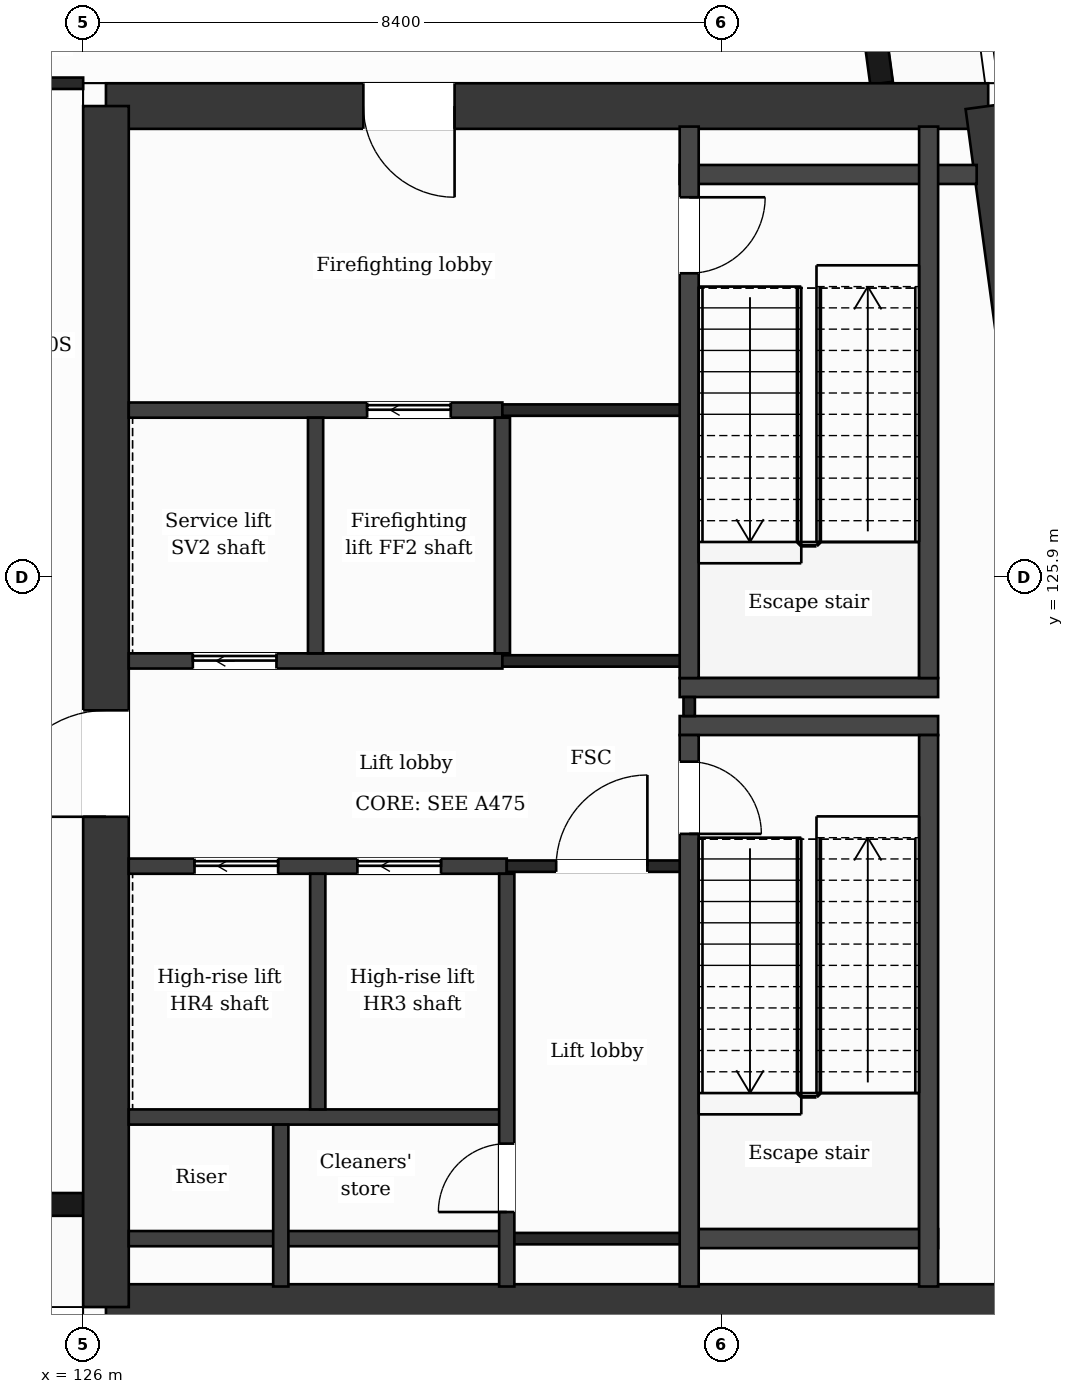
"""IFC4 building model, lengths in metres.
Left out: names, types, materials, properties, quantities, classifications, styles, units other than length and angle.
Written with IfcOpenShell. Run it as: python <this file> out.ifc"""

import sys

from ifc_helpers import new_model, si_unit, direction, frame, frame_2d, origin, place, context, subcontext, project, spatial, rectangle, extrude, element, fill, save


model = new_model("IFC4")
c1 = context("Model", 3, precision=1e-05, world=origin(), true_north=direction((0.0, 1.0)))
c2 = subcontext(c1, "Body", "Model", "MODEL_VIEW")
j1 = project(units=[si_unit("LENGTHUNIT", "METRE"), si_unit("PLANEANGLEUNIT", "RADIAN")], contexts=[c1])
p1 = place(None, origin())
s1 = spatial("IfcSite", under=j1, at=p1, CompositionType="ELEMENT")
p2 = place(p1, origin())
s2 = spatial("IfcBuilding", under=s1, at=p2, CompositionType="ELEMENT")
p3 = place(p2, frame((0.0, 0.0, 303.4)))
s3 = spatial("IfcBuildingStorey", under=s2, at=p3, CompositionType="ELEMENT", Elevation=303.4)
p4 = place(p3, frame((126.3, 132.1, 0.0), z_axis=(0.0, 0.0, 1.0), x_axis=(1.0, 0.0, 0.0)))
e1 = element("IfcWall", 1, at=p4, inside=s3, PredefinedType="SHEAR", context=c2, shape_type="SweptSolid", body=[
    extrude(rectangle(XDim=11.607, YDim=0.6, at=frame_2d((5.803, 0.0))), origin(), (0.0, 0.0, 1.0), 4.5),
])
p5 = place(p4, frame((3.386, 0.0, 0.0)))
e2 = element("IfcOpeningElement", 2, at=p5, cuts=e1, PredefinedType="OPENING", context=c2, shape_type="SweptSolid", body=[
    extrude(rectangle(XDim=1.2, YDim=2.1, at=frame_2d((0.6, 1.05))), frame((0.0, 0.31, 0.0), z_axis=(0.0, -1.0, 0.0), x_axis=(1.0, 0.0, 0.0)), (0.0, 0.0, 1.0), 0.62),
])
p6 = place(p3, frame((137.907, 132.1, 0.0), z_axis=(0.0, 0.0, 1.0), x_axis=(0.13341345841, -0.991060466932, 0.0)))
e3 = element("IfcWall", 3, at=p6, inside=s3, PredefinedType="SHEAR", context=c2, shape_type="SweptSolid", body=[
    extrude(rectangle(XDim=15.943, YDim=0.6, at=frame_2d((7.971, 0.0))), origin(), (0.0, 0.0, 1.0), 4.5),
])
p7 = place(p3, frame((140.034, 116.3, 0.0), z_axis=(0.0, 0.0, 1.0), x_axis=(-1.0, 0.0, 0.0)))
e4 = element("IfcWall", 4, at=p7, inside=s3, PredefinedType="SHEAR", context=c2, shape_type="SweptSolid", body=[
    extrude(rectangle(XDim=13.734, YDim=0.6, at=frame_2d((6.867, 0.0))), origin(), (0.0, 0.0, 1.0), 4.5),
])
p8 = place(p3, frame((126.3, 116.3, 0.0), z_axis=(0.0, 0.0, 1.0), x_axis=(0.0, 1.0, 0.0)))
e5 = element("IfcWall", 5, at=p8, inside=s3, PredefinedType="SHEAR", context=c2, shape_type="SweptSolid", body=[
    extrude(rectangle(XDim=15.8, YDim=0.6, at=frame_2d((7.9, 0.0))), origin(), (0.0, 0.0, 1.0), 4.5),
])
p9 = place(p8, frame((6.45, 0.0, 0.0)))
e6 = element("IfcOpeningElement", 6, at=p9, cuts=e5, PredefinedType="OPENING", context=c2, shape_type="SweptSolid", body=[
    extrude(rectangle(XDim=1.4, YDim=2.1, at=frame_2d((0.7, 1.05))), frame((0.0, 0.31, 0.0), z_axis=(0.0, -1.0, 0.0), x_axis=(1.0, 0.0, 0.0)), (0.0, 0.0, 1.0), 0.62),
])
p10 = place(p3, frame((100.8, 117.65, 0.0), z_axis=(0.0, 0.0, 1.0), x_axis=(1.0, 0.0, 0.0)))
e7 = element("IfcWall", 7, at=p10, inside=s3, PredefinedType="SOLIDWALL", context=c2, shape_type="SweptSolid", body=[
    extrude(rectangle(XDim=25.2, YDim=0.3, at=frame_2d((12.6, 0.0))), origin(), (0.0, 0.0, 1.0), 4.05),
])
p11 = place(p10, frame((1.55, 0.0, 0.9)))
e8 = element("IfcOpeningElement", 8, at=p11, cuts=e7, PredefinedType="OPENING", context=c2, shape_type="SweptSolid", body=[
    extrude(rectangle(XDim=1.2, YDim=2.1, at=frame_2d((0.6, 1.05))), frame((0.0, 0.16, 0.0), z_axis=(0.0, -1.0, 0.0), x_axis=(1.0, 0.0, 0.0)), (0.0, 0.0, 1.0), 0.32),
])
p12 = place(p10, frame((5.1, 0.0, 0.9)))
e9 = element("IfcOpeningElement", 9, at=p12, cuts=e7, PredefinedType="OPENING", context=c2, shape_type="SweptSolid", body=[
    extrude(rectangle(XDim=2.4, YDim=2.1, at=frame_2d((1.2, 1.05))), frame((0.0, 0.16, 0.0), z_axis=(0.0, -1.0, 0.0), x_axis=(1.0, 0.0, 0.0)), (0.0, 0.0, 1.0), 0.32),
])
p13 = place(p10, frame((9.9, 0.0, 0.0)))
e10 = element("IfcOpeningElement", 10, at=p13, cuts=e7, PredefinedType="OPENING", context=c2, shape_type="SweptSolid", body=[
    extrude(rectangle(XDim=1.2, YDim=2.4, at=frame_2d((0.6, 1.2))), frame((0.0, 0.16, 0.0), z_axis=(0.0, -1.0, 0.0), x_axis=(1.0, 0.0, 0.0)), (0.0, 0.0, 1.0), 0.32),
])
p14 = place(p10, frame((13.5, 0.0, 0.9)))
e11 = element("IfcOpeningElement", 11, at=p14, cuts=e7, PredefinedType="OPENING", context=c2, shape_type="SweptSolid", body=[
    extrude(rectangle(XDim=2.4, YDim=2.1, at=frame_2d((1.2, 1.05))), frame((0.0, 0.16, 0.0), z_axis=(0.0, -1.0, 0.0), x_axis=(1.0, 0.0, 0.0)), (0.0, 0.0, 1.0), 0.32),
])
p15 = place(p10, frame((17.7, 0.0, 0.9)))
e12 = element("IfcOpeningElement", 12, at=p15, cuts=e7, PredefinedType="OPENING", context=c2, shape_type="SweptSolid", body=[
    extrude(rectangle(XDim=2.4, YDim=2.1, at=frame_2d((1.2, 1.05))), frame((0.0, 0.16, 0.0), z_axis=(0.0, -1.0, 0.0), x_axis=(1.0, 0.0, 0.0)), (0.0, 0.0, 1.0), 0.32),
])
p16 = place(p10, frame((21.85, 0.0, 0.9)))
e13 = element("IfcOpeningElement", 13, at=p16, cuts=e7, PredefinedType="OPENING", context=c2, shape_type="SweptSolid", body=[
    extrude(rectangle(XDim=2.4, YDim=2.1, at=frame_2d((1.2, 1.05))), frame((0.0, 0.16, 0.0), z_axis=(0.0, -1.0, 0.0), x_axis=(1.0, 0.0, 0.0)), (0.0, 0.0, 1.0), 0.32),
])
p17 = place(p3, frame((136.504, 132.4, 0.0), z_axis=(0.0, 0.0, 1.0), x_axis=(-0.133399697462, 0.99106231929, 0.0)))
e14 = element("IfcWall", 14, at=p17, inside=s3, PredefinedType="SOLIDWALL", context=c2, shape_type="SweptSolid", body=[
    extrude(rectangle(XDim=6.74, YDim=0.3, at=frame_2d((3.37, 0.0))), origin(), (0.0, 0.0, 1.0), 4.05),
])
p18 = place(p17, frame((1.115, 0.0, 0.0)))
e15 = element("IfcOpeningElement", 15, at=p18, cuts=e14, PredefinedType="OPENING", context=c2, shape_type="SweptSolid", body=[
    extrude(rectangle(XDim=1.2, YDim=2.4, at=frame_2d((0.6, 1.2))), frame((0.0, 0.16, 0.0), z_axis=(0.0, -1.0, 0.0), x_axis=(1.0, 0.0, 0.0)), (0.0, 0.0, 1.0), 0.32),
])
p19 = place(p17, frame((3.835, 0.0, 0.9)))
e16 = element("IfcOpeningElement", 16, at=p19, cuts=e14, PredefinedType="OPENING", context=c2, shape_type="SweptSolid", body=[
    extrude(rectangle(XDim=2.4, YDim=2.1, at=frame_2d((1.2, 1.05))), frame((0.0, 0.16, 0.0), z_axis=(0.0, -1.0, 0.0), x_axis=(1.0, 0.0, 0.0)), (0.0, 0.0, 1.0), 0.32),
])
p20 = place(p3, frame((126.6, 117.2, 0.0), z_axis=(0.0, 0.0, 1.0), x_axis=(1.0, 0.0, 0.0)))
e17 = element("IfcWall", 17, at=p20, inside=s3, PredefinedType="PARTITIONING", context=c2, shape_type="SweptSolid", body=[
    extrude(rectangle(XDim=4.973, YDim=0.2, at=frame_2d((2.486, 0.0))), origin(), (0.0, 0.0, 1.0), 4.05),
])
p21 = place(p3, frame((131.573, 117.2, 0.0), z_axis=(0.0, 0.0, 1.0), x_axis=(1.0, 0.0, 0.0)))
e18 = element("IfcWall", 18, at=p21, inside=s3, PredefinedType="PARTITIONING", context=c2, shape_type="SweptSolid", body=[
    extrude(rectangle(XDim=2.4, YDim=0.15, at=frame_2d((1.2, 0.0))), origin(), (0.0, 0.0, 1.0), 4.05),
])
p22 = place(p3, frame((133.973, 117.2, 0.0), z_axis=(0.0, 0.0, 1.0), x_axis=(1.0, 0.0, 0.0)))
e19 = element("IfcWall", 19, at=p22, inside=s3, PredefinedType="PARTITIONING", context=c2, shape_type="SweptSolid", body=[
    extrude(rectangle(XDim=3.275, YDim=0.25, at=frame_2d((1.638, 0.0))), origin(), (0.0, 0.0, 1.0), 4.05),
])
p23 = place(p3, frame((126.6, 118.8, 0.0), z_axis=(0.0, 0.0, 1.0), x_axis=(1.0, 0.0, 0.0)))
e20 = element("IfcWall", 20, at=p23, inside=s3, PredefinedType="PARTITIONING", context=c2, shape_type="SweptSolid", body=[
    extrude(rectangle(XDim=4.973, YDim=0.2, at=frame_2d((2.486, 0.0))), origin(), (0.0, 0.0, 1.0), 4.05),
])
p24 = place(p3, frame((126.6, 122.1, 0.0), z_axis=(0.0, 0.0, 1.0), x_axis=(1.0, 0.0, 0.0)))
e21 = element("IfcWall", 21, at=p24, inside=s3, PredefinedType="PARTITIONING", context=c2, shape_type="SweptSolid", body=[
    extrude(rectangle(XDim=4.973, YDim=0.2, at=frame_2d((2.486, 0.0))), origin(), (0.0, 0.0, 1.0), 4.05),
])
p25 = place(p24, frame((3.008, 0.0, 0.0)))
e22 = element("IfcOpeningElement", 22, at=p25, cuts=e21, PredefinedType="OPENING", context=c2, shape_type="SweptSolid", body=[
    extrude(rectangle(XDim=1.1, YDim=2.1, at=frame_2d((0.55, 1.05))), frame((0.0, 0.11, 0.0), z_axis=(0.0, -1.0, 0.0), x_axis=(1.0, 0.0, 0.0)), (0.0, 0.0, 1.0), 0.22),
])
p26 = place(p24, frame((0.865, 0.0, 0.0)))
e23 = element("IfcOpeningElement", 23, at=p26, cuts=e21, PredefinedType="OPENING", context=c2, shape_type="SweptSolid", body=[
    extrude(rectangle(XDim=1.1, YDim=2.1, at=frame_2d((0.55, 1.05))), frame((0.0, 0.11, 0.0), z_axis=(0.0, -1.0, 0.0), x_axis=(1.0, 0.0, 0.0)), (0.0, 0.0, 1.0), 0.22),
])
p27 = place(p3, frame((131.573, 122.1, 0.0), z_axis=(0.0, 0.0, 1.0), x_axis=(1.0, 0.0, 0.0)))
e24 = element("IfcWall", 24, at=p27, inside=s3, PredefinedType="PARTITIONING", context=c2, shape_type="SweptSolid", body=[
    extrude(rectangle(XDim=2.4, YDim=0.15, at=frame_2d((1.2, 0.0))), origin(), (0.0, 0.0, 1.0), 4.05),
])
p28 = place(p27, frame((0.65, 0.0, 0.0)))
e25 = element("IfcOpeningElement", 25, at=p28, cuts=e24, PredefinedType="OPENING", context=c2, shape_type="SweptSolid", body=[
    extrude(rectangle(XDim=1.2, YDim=2.1, at=frame_2d((0.6, 1.05))), frame((0.0, 0.085, 0.0), z_axis=(0.0, -1.0, 0.0), x_axis=(1.0, 0.0, 0.0)), (0.0, 0.0, 1.0), 0.17),
])
for number, where, z_axis, x_axis in (
    (26, (133.848, 123.95, 0.0), (0.0, 0.0, 1.0), (1.0, 0.0, 0.0)),
    (27, (133.848, 124.45, 0.0), (0.0, 0.0, 1.0), (1.0, 0.0, 0.0)),
):
    element("IfcWall", number, at=place(p3, frame(where, z_axis=z_axis, x_axis=x_axis)), inside=s3, PredefinedType="PARTITIONING", context=c2, shape_type="SweptSolid", body=[
        extrude(rectangle(XDim=3.4, YDim=0.25, at=frame_2d((1.7, 0.0))), origin(), (0.0, 0.0, 1.0), 4.05),
    ])
p29 = place(p3, frame((126.6, 124.8, 0.0), z_axis=(0.0, 0.0, 1.0), x_axis=(1.0, 0.0, 0.0)))
e28 = element("IfcWall", 28, at=p29, inside=s3, PredefinedType="PARTITIONING", context=c2, shape_type="SweptSolid", body=[
    extrude(rectangle(XDim=4.915, YDim=0.2, at=frame_2d((2.458, 0.0))), origin(), (0.0, 0.0, 1.0), 4.05),
])
p30 = place(p29, frame((0.843, 0.0, 0.0)))
e29 = element("IfcOpeningElement", 29, at=p30, cuts=e28, PredefinedType="OPENING", context=c2, shape_type="SweptSolid", body=[
    extrude(rectangle(XDim=1.1, YDim=2.1, at=frame_2d((0.55, 1.05))), frame((0.0, 0.11, 0.0), z_axis=(0.0, -1.0, 0.0), x_axis=(1.0, 0.0, 0.0)), (0.0, 0.0, 1.0), 0.22),
])
p31 = place(p3, frame((131.515, 124.8, 0.0), z_axis=(0.0, 0.0, 1.0), x_axis=(1.0, 0.0, 0.0)))
e30 = element("IfcWall", 30, at=p31, inside=s3, PredefinedType="PARTITIONING", context=c2, shape_type="SweptSolid", body=[
    extrude(rectangle(XDim=2.583, YDim=0.15, at=frame_2d((1.291, 0.0))), origin(), (0.0, 0.0, 1.0), 4.05),
])
p32 = place(p3, frame((126.6, 128.1, 0.0), z_axis=(0.0, 0.0, 1.0), x_axis=(1.0, 0.0, 0.0)))
e31 = element("IfcWall", 31, at=p32, inside=s3, PredefinedType="PARTITIONING", context=c2, shape_type="SweptSolid", body=[
    extrude(rectangle(XDim=4.915, YDim=0.2, at=frame_2d((2.458, 0.0))), origin(), (0.0, 0.0, 1.0), 4.05),
])
p33 = place(p32, frame((3.136, 0.0, 0.0)))
e32 = element("IfcOpeningElement", 32, at=p33, cuts=e31, PredefinedType="OPENING", context=c2, shape_type="SweptSolid", body=[
    extrude(rectangle(XDim=1.1, YDim=2.1, at=frame_2d((0.55, 1.05))), frame((0.0, 0.11, 0.0), z_axis=(0.0, -1.0, 0.0), x_axis=(1.0, 0.0, 0.0)), (0.0, 0.0, 1.0), 0.22),
])
p34 = place(p3, frame((131.515, 128.1, 0.0), z_axis=(0.0, 0.0, 1.0), x_axis=(1.0, 0.0, 0.0)))
e33 = element("IfcWall", 33, at=p34, inside=s3, PredefinedType="PARTITIONING", context=c2, shape_type="SweptSolid", body=[
    extrude(rectangle(XDim=2.458, YDim=0.15, at=frame_2d((1.229, 0.0))), origin(), (0.0, 0.0, 1.0), 4.05),
])
p35 = place(p3, frame((133.848, 131.2, 0.0), z_axis=(0.0, 0.0, 1.0), x_axis=(1.0, 0.0, 0.0)))
e34 = element("IfcWall", 34, at=p35, inside=s3, PredefinedType="PARTITIONING", context=c2, shape_type="SweptSolid", body=[
    extrude(rectangle(XDim=3.907, YDim=0.25, at=frame_2d((1.954, 0.0))), origin(), (0.0, 0.0, 1.0), 4.05),
])
p36 = place(p3, frame((122.4, 132.4, 0.0), z_axis=(0.0, 0.0, 1.0), x_axis=(1.0, 0.0, 0.0)))
e35 = element("IfcWall", 35, at=p36, inside=s3, PredefinedType="PARTITIONING", context=c2, shape_type="SweptSolid", body=[
    extrude(rectangle(XDim=3.6, YDim=0.15, at=frame_2d((1.8, 0.0))), origin(), (0.0, 0.0, 1.0), 4.05),
])
p37 = place(p36, frame((0.6, 0.0, 0.0)))
e36 = element("IfcOpeningElement", 36, at=p37, cuts=e35, PredefinedType="OPENING", context=c2, shape_type="SweptSolid", body=[
    extrude(rectangle(XDim=2.4, YDim=2.1, at=frame_2d((1.2, 1.05))), frame((0.0, 0.085, 0.0), z_axis=(0.0, -1.0, 0.0), x_axis=(1.0, 0.0, 0.0)), (0.0, 0.0, 1.0), 0.17),
])
p38 = place(p3, frame((128.6, 116.57, 0.0), z_axis=(0.0, 0.0, 1.0), x_axis=(0.0, 1.0, 0.0)))
e37 = element("IfcWall", 37, at=p38, inside=s3, PredefinedType="PARTITIONING", context=c2, shape_type="SweptSolid", body=[
    extrude(rectangle(XDim=2.13, YDim=0.2, at=frame_2d((1.065, 0.0))), origin(), (0.0, 0.0, 1.0), 4.05),
])
for number, where, z_axis, x_axis in (
    (38, (129.058, 124.9, 0.0), (0.0, 0.0, 1.0), (0.0, 1.0, 0.0)),
    (39, (129.086, 118.9, 0.0), (0.0, 0.0, 1.0), (0.0, 1.0, 0.0)),
    (40, (131.515, 124.9, 0.0), (0.0, 0.0, 1.0), (0.0, 1.0, 0.0)),
):
    element("IfcWall", number, at=place(p3, frame(where, z_axis=z_axis, x_axis=x_axis)), inside=s3, PredefinedType="PARTITIONING", context=c2, shape_type="SweptSolid", body=[
        extrude(rectangle(XDim=3.1, YDim=0.2, at=frame_2d((1.55, 0.0))), origin(), (0.0, 0.0, 1.0), 4.05),
    ])
p39 = place(p3, frame((131.573, 116.57, 0.0), z_axis=(0.0, 0.0, 1.0), x_axis=(0.0, 1.0, 0.0)))
e41 = element("IfcWall", 41, at=p39, inside=s3, PredefinedType="PARTITIONING", context=c2, shape_type="SweptSolid", body=[
    extrude(rectangle(XDim=5.43, YDim=0.2, at=frame_2d((2.715, 0.0))), origin(), (0.0, 0.0, 1.0), 4.05),
])
p40 = place(p39, frame((0.98, 0.0, 0.0)))
e42 = element("IfcOpeningElement", 42, at=p40, cuts=e41, PredefinedType="OPENING", context=c2, shape_type="SweptSolid", body=[
    extrude(rectangle(XDim=0.9, YDim=2.1, at=frame_2d((0.45, 1.05))), frame((0.0, 0.11, 0.0), z_axis=(0.0, -1.0, 0.0), x_axis=(1.0, 0.0, 0.0)), (0.0, 0.0, 1.0), 0.22),
])
p41 = place(p3, frame((133.973, 124.075, 0.0), z_axis=(0.0, 0.0, 1.0), x_axis=(0.0, 1.0, 0.0)))
e43 = element("IfcWall", 43, at=p41, inside=s3, PredefinedType="PARTITIONING", context=c2, shape_type="SweptSolid", body=[
    extrude(rectangle(XDim=0.25, YDim=0.15, at=frame_2d((0.125, 0.0))), origin(), (0.0, 0.0, 1.0), 4.05),
])
p42 = place(p3, frame((133.973, 116.57, 0.0), z_axis=(0.0, 0.0, 1.0), x_axis=(0.0, 1.0, 0.0)))
e44 = element("IfcWall", 44, at=p42, inside=s3, PredefinedType="PARTITIONING", context=c2, shape_type="SweptSolid", body=[
    extrude(rectangle(XDim=7.255, YDim=0.25, at=frame_2d((3.627, 0.0))), origin(), (0.0, 0.0, 1.0), 4.05),
])
p43 = place(p42, frame((5.955, 0.0, 0.0)))
e45 = element("IfcOpeningElement", 45, at=p43, cuts=e44, PredefinedType="OPENING", context=c2, shape_type="SweptSolid", body=[
    extrude(rectangle(XDim=0.95, YDim=2.1, at=frame_2d((0.475, 1.05))), frame((0.0, 0.135, 0.0), z_axis=(0.0, -1.0, 0.0), x_axis=(1.0, 0.0, 0.0)), (0.0, 0.0, 1.0), 0.27),
])
p44 = place(p3, frame((133.973, 124.575, 0.0), z_axis=(0.0, 0.0, 1.0), x_axis=(0.0, 1.0, 0.0)))
e46 = element("IfcWall", 46, at=p44, inside=s3, PredefinedType="PARTITIONING", context=c2, shape_type="SweptSolid", body=[
    extrude(rectangle(XDim=7.255, YDim=0.25, at=frame_2d((3.627, 0.0))), origin(), (0.0, 0.0, 1.0), 4.05),
])
p45 = place(p44, frame((5.325, 0.0, 0.0)))
e47 = element("IfcOpeningElement", 47, at=p45, cuts=e46, PredefinedType="OPENING", context=c2, shape_type="SweptSolid", body=[
    extrude(rectangle(XDim=1.0, YDim=2.1, at=frame_2d((0.5, 1.05))), frame((0.0, 0.135, 0.0), z_axis=(0.0, -1.0, 0.0), x_axis=(1.0, 0.0, 0.0)), (0.0, 0.0, 1.0), 0.27),
])
p46 = place(p3, frame((137.123, 116.57, 0.0), z_axis=(0.0, 0.0, 1.0), x_axis=(0.0, 1.0, 0.0)))
e48 = element("IfcWall", 48, at=p46, inside=s3, PredefinedType="PARTITIONING", context=c2, shape_type="SweptSolid", body=[
    extrude(rectangle(XDim=7.255, YDim=0.25, at=frame_2d((3.627, 0.0))), origin(), (0.0, 0.0, 1.0), 4.05),
])
p47 = place(p3, frame((137.123, 124.575, 0.0), z_axis=(0.0, 0.0, 1.0), x_axis=(0.0, 1.0, 0.0)))
e49 = element("IfcWall", 49, at=p47, inside=s3, PredefinedType="PARTITIONING", context=c2, shape_type="SweptSolid", body=[
    extrude(rectangle(XDim=7.255, YDim=0.25, at=frame_2d((3.627, 0.0))), origin(), (0.0, 0.0, 1.0), 4.05),
])
p48 = place(p28, origin())
e50 = element("IfcDoor", 50, at=p48, inside=s3, OperationType="SINGLE_SWING_RIGHT", PredefinedType="DOOR", context=c2, shape_type="SweptSolid", body=[
    extrude(rectangle(XDim=1.2, YDim=2.1, at=frame_2d((0.6, 1.05))), frame((0.0, 0.025, 0.0), z_axis=(0.0, -1.0, 0.0), x_axis=(1.0, 0.0, 0.0)), (0.0, 0.0, 1.0), 0.05),
])
fill(e25, e50)
p49 = place(p25, origin())
e51 = element("IfcDoor", 51, at=p49, inside=s3, OperationType="SLIDING_TO_LEFT", PredefinedType="DOOR", context=c2, shape_type="SweptSolid", body=[
    extrude(rectangle(XDim=1.1, YDim=2.1, at=frame_2d((0.55, 1.05))), frame((0.0, 0.025, 0.0), z_axis=(0.0, -1.0, 0.0), x_axis=(1.0, 0.0, 0.0)), (0.0, 0.0, 1.0), 0.05),
])
fill(e22, e51)
p50 = place(p26, origin())
e52 = element("IfcDoor", 52, at=p50, inside=s3, OperationType="SLIDING_TO_LEFT", PredefinedType="DOOR", context=c2, shape_type="SweptSolid", body=[
    extrude(rectangle(XDim=1.1, YDim=2.1, at=frame_2d((0.55, 1.05))), frame((0.0, 0.025, 0.0), z_axis=(0.0, -1.0, 0.0), x_axis=(1.0, 0.0, 0.0)), (0.0, 0.0, 1.0), 0.05),
])
fill(e23, e52)
p51 = place(p33, origin())
e53 = element("IfcDoor", 53, at=p51, inside=s3, OperationType="SLIDING_TO_LEFT", PredefinedType="DOOR", context=c2, shape_type="SweptSolid", body=[
    extrude(rectangle(XDim=1.1, YDim=2.1, at=frame_2d((0.55, 1.05))), frame((0.0, 0.025, 0.0), z_axis=(0.0, -1.0, 0.0), x_axis=(1.0, 0.0, 0.0)), (0.0, 0.0, 1.0), 0.05),
])
fill(e32, e53)
p52 = place(p30, origin())
e54 = element("IfcDoor", 54, at=p52, inside=s3, OperationType="SLIDING_TO_LEFT", PredefinedType="DOOR", context=c2, shape_type="SweptSolid", body=[
    extrude(rectangle(XDim=1.1, YDim=2.1, at=frame_2d((0.55, 1.05))), frame((0.0, 0.025, 0.0), z_axis=(0.0, -1.0, 0.0), x_axis=(1.0, 0.0, 0.0)), (0.0, 0.0, 1.0), 0.05),
])
fill(e29, e54)
p53 = place(p43, origin())
e55 = element("IfcDoor", 55, at=p53, inside=s3, OperationType="SINGLE_SWING_LEFT", PredefinedType="DOOR", context=c2, shape_type="SweptSolid", body=[
    extrude(rectangle(XDim=0.95, YDim=2.1, at=frame_2d((0.475, 1.05))), frame((0.0, 0.025, 0.0), z_axis=(0.0, -1.0, 0.0), x_axis=(1.0, 0.0, 0.0)), (0.0, 0.0, 1.0), 0.05),
])
fill(e45, e55)
p54 = place(p45, origin())
e56 = element("IfcDoor", 56, at=p54, inside=s3, OperationType="SINGLE_SWING_RIGHT", PredefinedType="DOOR", context=c2, shape_type="SweptSolid", body=[
    extrude(rectangle(XDim=1.0, YDim=2.1, at=frame_2d((0.5, 1.05))), frame((0.0, 0.025, 0.0), z_axis=(0.0, -1.0, 0.0), x_axis=(1.0, 0.0, 0.0)), (0.0, 0.0, 1.0), 0.05),
])
fill(e47, e56)
p55 = place(p40, origin())
e57 = element("IfcDoor", 57, at=p55, inside=s3, OperationType="SINGLE_SWING_LEFT", PredefinedType="DOOR", context=c2, shape_type="SweptSolid", body=[
    extrude(rectangle(XDim=0.9, YDim=2.1, at=frame_2d((0.45, 1.05))), frame((0.0, 0.025, 0.0), z_axis=(0.0, -1.0, 0.0), x_axis=(1.0, 0.0, 0.0)), (0.0, 0.0, 1.0), 0.05),
])
fill(e42, e57)
p56 = place(p5, origin())
e58 = element("IfcDoor", 58, at=p56, inside=s3, OperationType="SINGLE_SWING_RIGHT", PredefinedType="DOOR", context=c2, shape_type="SweptSolid", body=[
    extrude(rectangle(XDim=1.2, YDim=2.1, at=frame_2d((0.6, 1.05))), frame((0.0, 0.025, 0.0), z_axis=(0.0, -1.0, 0.0), x_axis=(1.0, 0.0, 0.0)), (0.0, 0.0, 1.0), 0.05),
])
fill(e2, e58)
p57 = place(p9, origin())
e59 = element("IfcDoor", 59, at=p57, inside=s3, OperationType="SINGLE_SWING_LEFT", PredefinedType="DOOR", context=c2, shape_type="SweptSolid", body=[
    extrude(rectangle(XDim=1.4, YDim=2.1, at=frame_2d((0.7, 1.05))), frame((0.0, 0.025, 0.0), z_axis=(0.0, -1.0, 0.0), x_axis=(1.0, 0.0, 0.0)), (0.0, 0.0, 1.0), 0.05),
])
fill(e6, e59)
save(model, sys.argv[1])
